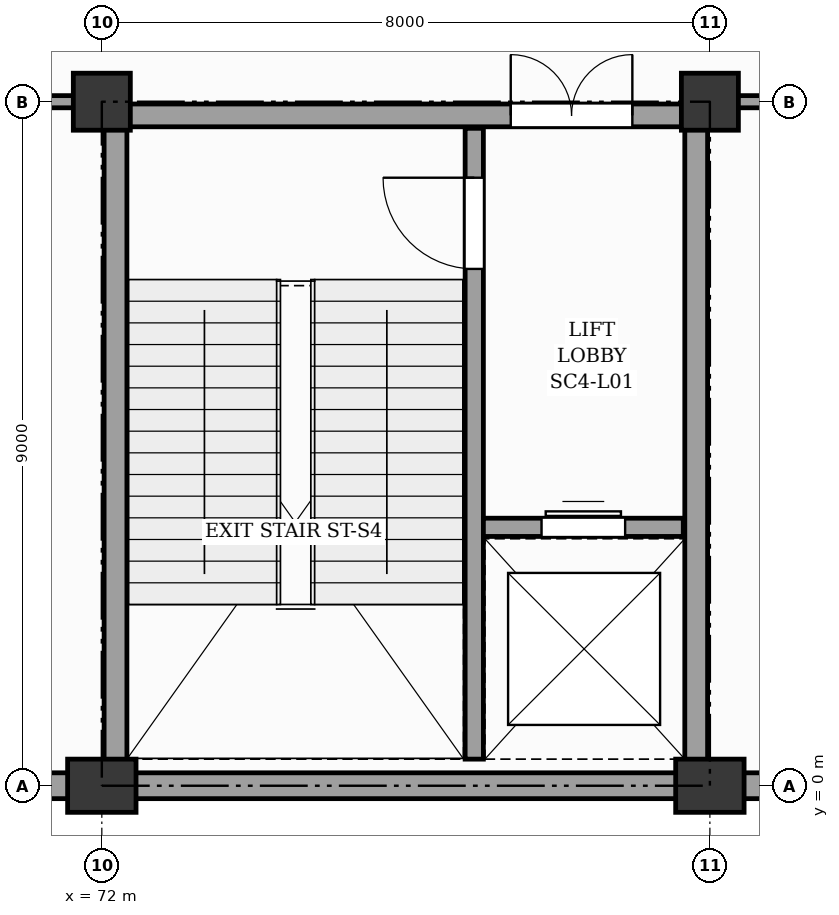
"""IFC4 building model, lengths in metres.
Left out: names, types, materials, properties, quantities, classifications, styles, units other than length and angle.
Written with IfcOpenShell. Run it as: python <this file> out.ifc"""

import sys

from ifc_helpers import new_model, si_unit, direction, frame, frame_2d, origin, origin_2d, place, context, subcontext, project, spatial, rectangle, extrude, element, fill, save


model = new_model("IFC4")
c1 = context("Model", 3, precision=1e-05, world=origin(), true_north=direction((0.0, 1.0)))
c2 = subcontext(c1, "Body", "Model", "MODEL_VIEW")
j1 = project(units=[si_unit("LENGTHUNIT", "METRE"), si_unit("PLANEANGLEUNIT", "RADIAN")], contexts=[c1])
p1 = place(None, origin())
s1 = spatial("IfcSite", under=j1, at=p1, CompositionType="ELEMENT")
p2 = place(p1, origin())
s2 = spatial("IfcBuilding", under=s1, at=p2, CompositionType="ELEMENT")
p3 = place(p2, frame((0.0, 0.0, 4.8)))
s3 = spatial("IfcBuildingStorey", under=s2, at=p3, CompositionType="ELEMENT", Elevation=4.8)
p4 = place(p3, frame((72.0, 0.0, 0.0), z_axis=(0.0, 0.0, 1.0), x_axis=(1.0, 0.0, 0.0)))
e1 = element("IfcColumn", 1, at=p4, inside=s3, PredefinedType="PILASTER", context=c2, shape_type="SweptSolid", body=[
    extrude(rectangle(XDim=0.9, YDim=0.7, at=origin_2d()), origin(), (0.0, 0.0, 1.0), 4.8),
])
p5 = place(p3, frame((72.0, 9.0, 0.0), z_axis=(0.0, 0.0, 1.0), x_axis=(1.0, 0.0, 0.0)))
e2 = element("IfcColumn", 2, at=p5, inside=s3, PredefinedType="COLUMN", context=c2, shape_type="SweptSolid", body=[
    extrude(rectangle(XDim=0.75, YDim=0.75, at=origin_2d()), origin(), (0.0, 0.0, 1.0), 4.8),
])
p6 = place(p3, frame((80.0, 0.0, 0.0), z_axis=(0.0, 0.0, 1.0), x_axis=(1.0, 0.0, 0.0)))
e3 = element("IfcColumn", 3, at=p6, inside=s3, PredefinedType="PILASTER", context=c2, shape_type="SweptSolid", body=[
    extrude(rectangle(XDim=0.9, YDim=0.7, at=origin_2d()), origin(), (0.0, 0.0, 1.0), 4.8),
])
p7 = place(p3, frame((80.0, 9.0, 0.0), z_axis=(0.0, 0.0, 1.0), x_axis=(1.0, 0.0, 0.0)))
e4 = element("IfcColumn", 4, at=p7, inside=s3, PredefinedType="COLUMN", context=c2, shape_type="SweptSolid", body=[
    extrude(rectangle(XDim=0.75, YDim=0.75, at=origin_2d()), origin(), (0.0, 0.0, 1.0), 4.8),
])
p8 = place(p3, frame((64.4, 0.0, 0.0), z_axis=(0.0, 0.0, 1.0), x_axis=(1.0, 0.0, 0.0)))
e5 = element("IfcWall", 5, at=p8, inside=s3, PredefinedType="SOLIDWALL", context=c2, shape_type="SweptSolid", body=[
    extrude(rectangle(XDim=7.2, YDim=0.34, at=frame_2d((3.6, 0.0))), origin(), (0.0, 0.0, 1.0), 3.08),
])
for number, where, z_axis, x_axis in (
    (6, (72.4, 0.0, 0.0), (0.0, 0.0, 1.0), (1.0, 0.0, 0.0)),
    (7, (80.4, 0.0, 0.0), (0.0, 0.0, 1.0), (1.0, 0.0, 0.0)),
):
    element("IfcWall", number, at=place(p3, frame(where, z_axis=z_axis, x_axis=x_axis)), inside=s3, PredefinedType="SOLIDWALL", context=c2, shape_type="SweptSolid", body=[
        extrude(rectangle(XDim=7.2, YDim=0.34, at=frame_2d((3.6, 0.0))), origin(), (0.0, 0.0, 1.0), 3.84),
    ])
p9 = place(p3, frame((76.9, 0.35, 0.0), z_axis=(0.0, 0.0, 1.0), x_axis=(0.0, 1.0, 0.0)))
e8 = element("IfcWall", 8, at=p9, inside=s3, PredefinedType="SHEAR", context=c2, shape_type="SweptSolid", body=[
    extrude(rectangle(XDim=8.3, YDim=0.24, at=frame_2d((4.15, 0.0))), origin(), (0.0, 0.0, 1.0), 4.52),
])
p10 = place(p9, frame((6.45, 0.0, 0.0)))
e9 = element("IfcOpeningElement", 9, at=p10, cuts=e8, PredefinedType="OPENING", context=c2, shape_type="SweptSolid", body=[
    extrude(rectangle(XDim=1.2, YDim=2.15, at=frame_2d((0.6, 1.075))), frame((0.0, 0.13, 0.0), z_axis=(0.0, -1.0, 0.0), x_axis=(1.0, 0.0, 0.0)), (0.0, 0.0, 1.0), 0.26),
])
p11 = place(p3, frame((77.02, 3.4, 0.0), z_axis=(0.0, 0.0, 1.0), x_axis=(1.0, 0.0, 0.0)))
e10 = element("IfcWall", 10, at=p11, inside=s3, PredefinedType="SHEAR", context=c2, shape_type="SweptSolid", body=[
    extrude(rectangle(XDim=2.63, YDim=0.24, at=frame_2d((1.315, 0.0))), origin(), (0.0, 0.0, 1.0), 4.52),
])
p12 = place(p11, frame((0.765, 0.0, 0.0)))
e11 = element("IfcOpeningElement", 11, at=p12, cuts=e10, PredefinedType="OPENING", context=c2, shape_type="SweptSolid", body=[
    extrude(rectangle(XDim=1.1, YDim=2.15, at=frame_2d((0.55, 1.075))), frame((0.0, 0.13, 0.0), z_axis=(0.0, -1.0, 0.0), x_axis=(1.0, 0.0, 0.0)), (0.0, 0.0, 1.0), 0.26),
])
for number, where, z_axis, x_axis in (
    (12, (72.18, 0.18, 0.0), (0.0, 0.0, 1.0), (0.0, 1.0, 0.0)),
    (13, (79.82, 0.18, 0.0), (0.0, 0.0, 1.0), (0.0, 1.0, 0.0)),
):
    element("IfcWall", number, at=place(p3, frame(where, z_axis=z_axis, x_axis=x_axis)), inside=s3, PredefinedType="SHEAR", context=c2, shape_type="SweptSolid", body=[
        extrude(rectangle(XDim=8.64, YDim=0.3, at=frame_2d((4.32, 0.0))), origin(), (0.0, 0.0, 1.0), 4.52),
    ])
p13 = place(p3, frame((72.03, 8.82, 0.0), z_axis=(0.0, 0.0, 1.0), x_axis=(1.0, 0.0, 0.0)))
e14 = element("IfcWall", 14, at=p13, inside=s3, PredefinedType="SHEAR", context=c2, shape_type="SweptSolid", body=[
    extrude(rectangle(XDim=7.94, YDim=0.3, at=frame_2d((3.97, 0.0))), origin(), (0.0, 0.0, 1.0), 4.52),
])
p14 = place(p13, frame((5.35, 0.0, 0.0)))
e15 = element("IfcOpeningElement", 15, at=p14, cuts=e14, PredefinedType="OPENING", context=c2, shape_type="SweptSolid", body=[
    extrude(rectangle(XDim=1.6, YDim=2.15, at=frame_2d((0.8, 1.075))), frame((0.0, 0.16, 0.0), z_axis=(0.0, -1.0, 0.0), x_axis=(1.0, 0.0, 0.0)), (0.0, 0.0, 1.0), 0.32),
])
p15 = place(p3, frame((80.3, 9.0, 0.0), z_axis=(0.0, 0.0, 1.0), x_axis=(1.0, 0.0, 0.0)))
e16 = element("IfcWall", 16, at=p15, inside=s3, PredefinedType="PARTITIONING", context=c2, shape_type="SweptSolid", body=[
    extrude(rectangle(XDim=7.4, YDim=0.16, at=frame_2d((3.7, 0.0))), origin(), (0.0, 0.0, 1.0), 3.66),
])
p16 = place(p15, frame((3.2, 0.0, 0.0)))
e17 = element("IfcOpeningElement", 17, at=p16, cuts=e16, PredefinedType="OPENING", context=c2, shape_type="SweptSolid", body=[
    extrude(rectangle(XDim=1.0, YDim=2.1, at=frame_2d((0.5, 1.05))), frame((0.0, 0.09, 0.0), z_axis=(0.0, -1.0, 0.0), x_axis=(1.0, 0.0, 0.0)), (0.0, 0.0, 1.0), 0.18),
])
p17 = place(p3, frame((64.3, 9.0, 0.0), z_axis=(0.0, 0.0, 1.0), x_axis=(1.0, 0.0, 0.0)))
e18 = element("IfcWall", 18, at=p17, inside=s3, PredefinedType="PARTITIONING", context=c2, shape_type="SweptSolid", body=[
    extrude(rectangle(XDim=7.4, YDim=0.16, at=frame_2d((3.7, 0.0))), origin(), (0.0, 0.0, 1.0), 2.83),
])
p18 = place(p10, origin())
e19 = element("IfcDoor", 19, at=p18, inside=s3, OperationType="SINGLE_SWING_RIGHT", PredefinedType="DOOR", context=c2, shape_type="SweptSolid", body=[
    extrude(rectangle(XDim=1.2, YDim=2.15, at=frame_2d((0.6, 1.075))), frame((0.0, 0.025, 0.0), z_axis=(0.0, -1.0, 0.0), x_axis=(1.0, 0.0, 0.0)), (0.0, 0.0, 1.0), 0.05),
])
fill(e9, e19)
p19 = place(p12, origin())
e20 = element("IfcDoor", 20, at=p19, inside=s3, OperationType="DOUBLE_DOOR_SLIDING", PredefinedType="DOOR", context=c2, shape_type="SweptSolid", body=[
    extrude(rectangle(XDim=1.1, YDim=2.15, at=frame_2d((0.55, 1.075))), frame((0.0, 0.025, 0.0), z_axis=(0.0, -1.0, 0.0), x_axis=(1.0, 0.0, 0.0)), (0.0, 0.0, 1.0), 0.05),
])
fill(e11, e20)
p20 = place(p14, origin())
e21 = element("IfcDoor", 21, at=p20, inside=s3, OperationType="DOUBLE_DOOR_SINGLE_SWING", PredefinedType="DOOR", context=c2, shape_type="SweptSolid", body=[
    extrude(rectangle(XDim=1.6, YDim=2.15, at=frame_2d((0.8, 1.075))), frame((0.0, 0.025, 0.0), z_axis=(0.0, -1.0, 0.0), x_axis=(1.0, 0.0, 0.0)), (0.0, 0.0, 1.0), 0.05),
])
fill(e15, e21)
save(model, sys.argv[1])
